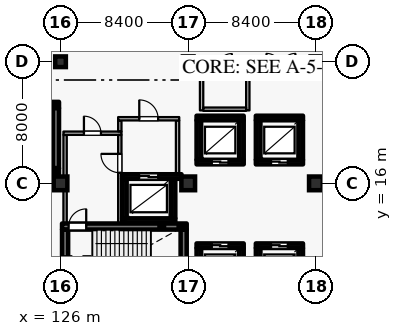
"""IFC4 building model, lengths in metres.
Left out: names, types, materials, properties, quantities, classifications, styles, units other than length and angle.
Written with IfcOpenShell. Run it as: python <this file> out.ifc"""

import sys

from ifc_helpers import new_model, si_unit, direction, frame, frame_2d, origin, origin_2d, place, context, subcontext, project, spatial, rectangle, hollow_rectangle, extrude, element, fill, save


model = new_model("IFC4")
c1 = context("Model", 3, precision=1e-05, world=origin(), true_north=direction((0.0, 1.0)))
c2 = subcontext(c1, "Body", "Model", "MODEL_VIEW")
j1 = project(units=[si_unit("LENGTHUNIT", "METRE"), si_unit("PLANEANGLEUNIT", "RADIAN")], contexts=[c1])
p1 = place(None, origin())
s1 = spatial("IfcSite", under=j1, at=p1, CompositionType="ELEMENT")
p2 = place(p1, origin())
s2 = spatial("IfcBuilding", under=s1, at=p2, CompositionType="ELEMENT")
p3 = place(p2, frame((0.0, 0.0, 11.4)))
s3 = spatial("IfcBuildingStorey", under=s2, at=p3, CompositionType="ELEMENT", Elevation=11.4)
for number, where, z_axis, x_axis in (
    (1, (126.0, 16.0, 0.0), (0.0, 0.0, 1.0), (1.0, 0.0, 0.0)),
    (2, (134.4, 16.0, 0.0), (0.0, 0.0, 1.0), (1.0, 0.0, 0.0)),
    (3, (142.8, 16.0, 0.0), (0.0, 0.0, 1.0), (1.0, 0.0, 0.0)),
):
    element("IfcColumn", number, at=place(p3, frame(where, z_axis=z_axis, x_axis=x_axis)), inside=s3, PredefinedType="COLUMN", context=c2, shape_type="SweptSolid", body=[
        extrude(rectangle(XDim=0.9, YDim=0.9, at=origin_2d()), origin(), (0.0, 0.0, 1.0), 4.8),
    ])
for number, where, z_axis, x_axis in (
    (4, (126.0, 24.0, 0.0), (0.0, 0.0, 1.0), (1.0, 0.0, 0.0)),
    (5, (134.4, 24.0, 0.0), (0.0, 0.0, 1.0), (1.0, 0.0, 0.0)),
    (6, (142.8, 24.0, 0.0), (0.0, 0.0, 1.0), (1.0, 0.0, 0.0)),
):
    element("IfcColumn", number, at=place(p3, frame(where, z_axis=z_axis, x_axis=x_axis)), inside=s3, PredefinedType="COLUMN", context=c2, shape_type="SweptSolid", body=[
        extrude(rectangle(XDim=0.7, YDim=0.7, at=origin_2d()), origin(), (0.0, 0.0, 1.0), 4.8),
    ])
p4 = place(p3, frame((134.95, 17.4, 0.0), z_axis=(0.0, 0.0, 1.0), x_axis=(1.0, 0.0, 0.0)))
e7 = element("IfcWall", 7, at=p4, inside=s3, PredefinedType="SHEAR", context=c2, shape_type="SweptSolid", body=[
    extrude(rectangle(XDim=3.1, YDim=0.3, at=frame_2d((1.55, 0.0))), origin(), (0.0, 0.0, 1.0), 4.535),
])
p5 = place(p4, frame((1.0, 0.0, 0.0)))
e8 = element("IfcOpeningElement", 8, at=p5, cuts=e7, PredefinedType="OPENING", context=c2, shape_type="SweptSolid", body=[
    extrude(rectangle(XDim=1.1, YDim=2.2, at=frame_2d((0.55, 1.1))), frame((0.0, 0.16, 0.0), z_axis=(0.0, -1.0, 0.0), x_axis=(1.0, 0.0, 0.0)), (0.0, 0.0, 1.0), 0.32),
])
p6 = place(p3, frame((137.9, 17.555, 0.0), z_axis=(0.0, 0.0, 1.0), x_axis=(0.0, 1.0, 0.0)))
e9 = element("IfcWall", 9, at=p6, inside=s3, PredefinedType="SHEAR", context=c2, shape_type="SweptSolid", body=[
    extrude(rectangle(XDim=2.59, YDim=0.3, at=frame_2d((1.295, 0.0))), origin(), (0.0, 0.0, 1.0), 4.535),
])
p7 = place(p3, frame((138.05, 20.3, 0.0), z_axis=(0.0, 0.0, 1.0), x_axis=(-1.0, 0.0, 0.0)))
e10 = element("IfcWall", 10, at=p7, inside=s3, PredefinedType="SHEAR", context=c2, shape_type="SweptSolid", body=[
    extrude(rectangle(XDim=3.1, YDim=0.3, at=frame_2d((1.55, 0.0))), origin(), (0.0, 0.0, 1.0), 4.535),
])
p8 = place(p3, frame((135.1, 20.145, 0.0), z_axis=(0.0, 0.0, 1.0), x_axis=(0.0, -1.0, 0.0)))
e11 = element("IfcWall", 11, at=p8, inside=s3, PredefinedType="SHEAR", context=c2, shape_type="SweptSolid", body=[
    extrude(rectangle(XDim=2.59, YDim=0.3, at=frame_2d((1.295, 0.0))), origin(), (0.0, 0.0, 1.0), 4.535),
])
p9 = place(p3, frame((138.85, 17.4, 0.0), z_axis=(0.0, 0.0, 1.0), x_axis=(1.0, 0.0, 0.0)))
e12 = element("IfcWall", 12, at=p9, inside=s3, PredefinedType="SHEAR", context=c2, shape_type="SweptSolid", body=[
    extrude(rectangle(XDim=3.1, YDim=0.3, at=frame_2d((1.55, 0.0))), origin(), (0.0, 0.0, 1.0), 4.535),
])
p10 = place(p9, frame((1.0, 0.0, 0.0)))
e13 = element("IfcOpeningElement", 13, at=p10, cuts=e12, PredefinedType="OPENING", context=c2, shape_type="SweptSolid", body=[
    extrude(rectangle(XDim=1.1, YDim=2.2, at=frame_2d((0.55, 1.1))), frame((0.0, 0.16, 0.0), z_axis=(0.0, -1.0, 0.0), x_axis=(1.0, 0.0, 0.0)), (0.0, 0.0, 1.0), 0.32),
])
p11 = place(p3, frame((141.8, 17.555, 0.0), z_axis=(0.0, 0.0, 1.0), x_axis=(0.0, 1.0, 0.0)))
e14 = element("IfcWall", 14, at=p11, inside=s3, PredefinedType="SHEAR", context=c2, shape_type="SweptSolid", body=[
    extrude(rectangle(XDim=2.59, YDim=0.3, at=frame_2d((1.295, 0.0))), origin(), (0.0, 0.0, 1.0), 4.535),
])
p12 = place(p3, frame((141.95, 20.3, 0.0), z_axis=(0.0, 0.0, 1.0), x_axis=(-1.0, 0.0, 0.0)))
e15 = element("IfcWall", 15, at=p12, inside=s3, PredefinedType="SHEAR", context=c2, shape_type="SweptSolid", body=[
    extrude(rectangle(XDim=3.1, YDim=0.3, at=frame_2d((1.55, 0.0))), origin(), (0.0, 0.0, 1.0), 4.535),
])
for number, where, z_axis, x_axis in (
    (16, (139.0, 20.145, 0.0), (0.0, 0.0, 1.0), (0.0, -1.0, 0.0)),
    (17, (137.9, 9.155, 0.0), (0.0, 0.0, 1.0), (0.0, 1.0, 0.0)),
):
    element("IfcWall", number, at=place(p3, frame(where, z_axis=z_axis, x_axis=x_axis)), inside=s3, PredefinedType="SHEAR", context=c2, shape_type="SweptSolid", body=[
        extrude(rectangle(XDim=2.59, YDim=0.3, at=frame_2d((1.295, 0.0))), origin(), (0.0, 0.0, 1.0), 4.535),
    ])
p13 = place(p3, frame((138.05, 11.9, 0.0), z_axis=(0.0, 0.0, 1.0), x_axis=(-1.0, 0.0, 0.0)))
e18 = element("IfcWall", 18, at=p13, inside=s3, PredefinedType="SHEAR", context=c2, shape_type="SweptSolid", body=[
    extrude(rectangle(XDim=3.1, YDim=0.3, at=frame_2d((1.55, 0.0))), origin(), (0.0, 0.0, 1.0), 4.535),
])
p14 = place(p13, frame((1.0, 0.0, 0.0)))
e19 = element("IfcOpeningElement", 19, at=p14, cuts=e18, PredefinedType="OPENING", context=c2, shape_type="SweptSolid", body=[
    extrude(rectangle(XDim=1.1, YDim=2.2, at=frame_2d((0.55, 1.1))), frame((0.0, 0.16, 0.0), z_axis=(0.0, -1.0, 0.0), x_axis=(1.0, 0.0, 0.0)), (0.0, 0.0, 1.0), 0.32),
])
for number, where, z_axis, x_axis in (
    (20, (135.1, 11.745, 0.0), (0.0, 0.0, 1.0), (0.0, -1.0, 0.0)),
    (21, (141.8, 9.155, 0.0), (0.0, 0.0, 1.0), (0.0, 1.0, 0.0)),
):
    element("IfcWall", number, at=place(p3, frame(where, z_axis=z_axis, x_axis=x_axis)), inside=s3, PredefinedType="SHEAR", context=c2, shape_type="SweptSolid", body=[
        extrude(rectangle(XDim=2.59, YDim=0.3, at=frame_2d((1.295, 0.0))), origin(), (0.0, 0.0, 1.0), 4.535),
    ])
p15 = place(p3, frame((141.95, 11.9, 0.0), z_axis=(0.0, 0.0, 1.0), x_axis=(-1.0, 0.0, 0.0)))
e22 = element("IfcWall", 22, at=p15, inside=s3, PredefinedType="SHEAR", context=c2, shape_type="SweptSolid", body=[
    extrude(rectangle(XDim=3.1, YDim=0.3, at=frame_2d((1.55, 0.0))), origin(), (0.0, 0.0, 1.0), 4.535),
])
p16 = place(p15, frame((1.0, 0.0, 0.0)))
e23 = element("IfcOpeningElement", 23, at=p16, cuts=e22, PredefinedType="OPENING", context=c2, shape_type="SweptSolid", body=[
    extrude(rectangle(XDim=1.1, YDim=2.2, at=frame_2d((0.55, 1.1))), frame((0.0, 0.16, 0.0), z_axis=(0.0, -1.0, 0.0), x_axis=(1.0, 0.0, 0.0)), (0.0, 0.0, 1.0), 0.32),
])
p17 = place(p3, frame((139.0, 11.745, 0.0), z_axis=(0.0, 0.0, 1.0), x_axis=(0.0, -1.0, 0.0)))
e24 = element("IfcWall", 24, at=p17, inside=s3, PredefinedType="SHEAR", context=c2, shape_type="SweptSolid", body=[
    extrude(rectangle(XDim=2.59, YDim=0.3, at=frame_2d((1.295, 0.0))), origin(), (0.0, 0.0, 1.0), 4.535),
])
p18 = place(p3, frame((130.05, 13.55, 0.0), z_axis=(0.0, 0.0, 1.0), x_axis=(1.0, 0.0, 0.0)))
e25 = element("IfcWall", 25, at=p18, inside=s3, PredefinedType="SHEAR", context=c2, shape_type="SweptSolid", body=[
    extrude(rectangle(XDim=3.5, YDim=0.3, at=frame_2d((1.75, 0.0))), origin(), (0.0, 0.0, 1.0), 4.535),
])
p19 = place(p3, frame((133.4, 13.705, 0.0), z_axis=(0.0, 0.0, 1.0), x_axis=(0.0, 1.0, 0.0)))
e26 = element("IfcWall", 26, at=p19, inside=s3, PredefinedType="SHEAR", context=c2, shape_type="SweptSolid", body=[
    extrude(rectangle(XDim=2.59, YDim=0.3, at=frame_2d((1.295, 0.0))), origin(), (0.0, 0.0, 1.0), 4.535),
])
p20 = place(p3, frame((133.96, 16.45, 0.0), z_axis=(0.0, 0.0, 1.0), x_axis=(-1.0, 0.0, 0.0)))
e27 = element("IfcWall", 27, at=p20, inside=s3, PredefinedType="SHEAR", context=c2, shape_type="SweptSolid", body=[
    extrude(rectangle(XDim=3.91, YDim=0.3, at=frame_2d((1.955, 0.0))), origin(), (0.0, 0.0, 1.0), 4.535),
])
p21 = place(p20, frame((1.535, 0.0, 0.0)))
e28 = element("IfcOpeningElement", 28, at=p21, cuts=e27, PredefinedType="OPENING", context=c2, shape_type="SweptSolid", body=[
    extrude(rectangle(XDim=1.25, YDim=2.25, at=frame_2d((0.625, 1.125))), frame((0.0, 0.16, 0.0), z_axis=(0.0, -1.0, 0.0), x_axis=(1.0, 0.0, 0.0)), (0.0, 0.0, 1.0), 0.32),
])
p22 = place(p3, frame((130.2, 16.295, 0.0), z_axis=(0.0, 0.0, 1.0), x_axis=(0.0, -1.0, 0.0)))
e29 = element("IfcWall", 29, at=p22, inside=s3, PredefinedType="SHEAR", context=c2, shape_type="SweptSolid", body=[
    extrude(rectangle(XDim=2.59, YDim=0.3, at=frame_2d((1.295, 0.0))), origin(), (0.0, 0.0, 1.0), 4.535),
])
p23 = place(p3, frame((134.1, 9.005, 0.0), z_axis=(0.0, 0.0, 1.0), x_axis=(0.0, 1.0, 0.0)))
e30 = element("IfcWall", 30, at=p23, inside=s3, PredefinedType="SHEAR", context=c2, shape_type="SweptSolid", body=[
    extrude(rectangle(XDim=3.95, YDim=0.4, at=frame_2d((1.975, 0.0))), origin(), (0.0, 0.0, 1.0), 4.535),
])
p24 = place(p3, frame((126.1, 13.16, 0.0), z_axis=(0.0, 0.0, 1.0), x_axis=(1.0, 0.0, 0.0)))
e31 = element("IfcWall", 31, at=p24, inside=s3, PredefinedType="SHEAR", context=c2, shape_type="SweptSolid", body=[
    extrude(rectangle(XDim=8.2, YDim=0.4, at=frame_2d((4.1, 0.0))), origin(), (0.0, 0.0, 1.0), 4.535),
])
p25 = place(p24, frame((0.43, 0.0, 0.0)))
e32 = element("IfcOpeningElement", 32, at=p25, cuts=e31, PredefinedType="OPENING", context=c2, shape_type="SweptSolid", body=[
    extrude(rectangle(XDim=1.16, YDim=2.2, at=frame_2d((0.58, 1.1))), frame((0.0, 0.21, 0.0), z_axis=(0.0, -1.0, 0.0), x_axis=(1.0, 0.0, 0.0)), (0.0, 0.0, 1.0), 0.42),
])
p26 = place(p3, frame((126.3, 9.005, 0.0), z_axis=(0.0, 0.0, 1.0), x_axis=(0.0, 1.0, 0.0)))
e33 = element("IfcWall", 33, at=p26, inside=s3, PredefinedType="SHEAR", context=c2, shape_type="SweptSolid", body=[
    extrude(rectangle(XDim=3.95, YDim=0.4, at=frame_2d((1.975, 0.0))), origin(), (0.0, 0.0, 1.0), 4.535),
])
p27 = place(p3, frame((126.3, 13.365, 0.0), z_axis=(0.0, 0.0, 1.0), x_axis=(0.0, 1.0, 0.0)))
e34 = element("IfcWall", 34, at=p27, inside=s3, PredefinedType="PARTITIONING", context=c2, shape_type="SweptSolid", body=[
    extrude(rectangle(XDim=5.82, YDim=0.22, at=frame_2d((2.91, 0.0))), origin(), (0.0, 0.0, 1.0), 4.535),
])
p28 = place(p3, frame((126.19, 19.3, 0.0), z_axis=(0.0, 0.0, 1.0), x_axis=(1.0, 0.0, 0.0)))
e35 = element("IfcWall", 35, at=p28, inside=s3, PredefinedType="PARTITIONING", context=c2, shape_type="SweptSolid", body=[
    extrude(rectangle(XDim=3.82, YDim=0.22, at=frame_2d((1.91, 0.0))), origin(), (0.0, 0.0, 1.0), 4.535),
])
p29 = place(p28, frame((1.35, 0.0, 0.0)))
e36 = element("IfcOpeningElement", 36, at=p29, cuts=e35, PredefinedType="OPENING", context=c2, shape_type="SweptSolid", body=[
    extrude(rectangle(XDim=1.12, YDim=2.2, at=frame_2d((0.56, 1.1))), frame((0.0, 0.12, 0.0), z_axis=(0.0, -1.0, 0.0), x_axis=(1.0, 0.0, 0.0)), (0.0, 0.0, 1.0), 0.24),
])
p30 = place(p3, frame((129.9, 13.365, 0.0), z_axis=(0.0, 0.0, 1.0), x_axis=(0.0, 1.0, 0.0)))
e37 = element("IfcWall", 37, at=p30, inside=s3, PredefinedType="PARTITIONING", context=c2, shape_type="SweptSolid", body=[
    extrude(rectangle(XDim=5.82, YDim=0.22, at=frame_2d((2.91, 0.0))), origin(), (0.0, 0.0, 1.0), 4.535),
])
p31 = place(p30, frame((3.335, 0.0, 0.0)))
e38 = element("IfcOpeningElement", 38, at=p31, cuts=e37, PredefinedType="OPENING", context=c2, shape_type="SweptSolid", body=[
    extrude(rectangle(XDim=1.24, YDim=2.2, at=frame_2d((0.62, 1.1))), frame((0.0, 0.12, 0.0), z_axis=(0.0, -1.0, 0.0), x_axis=(1.0, 0.0, 0.0)), (0.0, 0.0, 1.0), 0.24),
])
p32 = place(p3, frame((129.9, 19.415, 0.0), z_axis=(0.0, 0.0, 1.0), x_axis=(0.0, 1.0, 0.0)))
e39 = element("IfcWall", 39, at=p32, inside=s3, PredefinedType="PARTITIONING", context=c2, shape_type="SweptSolid", body=[
    extrude(rectangle(XDim=0.72, YDim=0.22, at=frame_2d((0.36, 0.0))), origin(), (0.0, 0.0, 1.0), 4.535),
])
p33 = place(p3, frame((133.7, 16.605, 0.0), z_axis=(0.0, 0.0, 1.0), x_axis=(0.0, 1.0, 0.0)))
e40 = element("IfcWall", 40, at=p33, inside=s3, PredefinedType="PARTITIONING", context=c2, shape_type="SweptSolid", body=[
    extrude(rectangle(XDim=3.53, YDim=0.22, at=frame_2d((1.765, 0.0))), origin(), (0.0, 0.0, 1.0), 4.535),
])
p34 = place(p3, frame((129.79, 20.25, 0.0), z_axis=(0.0, 0.0, 1.0), x_axis=(1.0, 0.0, 0.0)))
e41 = element("IfcWall", 41, at=p34, inside=s3, PredefinedType="PARTITIONING", context=c2, shape_type="SweptSolid", body=[
    extrude(rectangle(XDim=4.02, YDim=0.22, at=frame_2d((2.01, 0.0))), origin(), (0.0, 0.0, 1.0), 4.535),
])
p35 = place(p34, frame((1.39, 0.0, 0.0)))
e42 = element("IfcOpeningElement", 42, at=p35, cuts=e41, PredefinedType="OPENING", context=c2, shape_type="SweptSolid", body=[
    extrude(rectangle(XDim=1.24, YDim=2.2, at=frame_2d((0.62, 1.1))), frame((0.0, 0.12, 0.0), z_axis=(0.0, -1.0, 0.0), x_axis=(1.0, 0.0, 0.0)), (0.0, 0.0, 1.0), 0.24),
])
for number, where, z_axis, x_axis in (
    (43, (132.66, 13.16, -2.7), (0.0, 0.0, 1.0), (1.0, 0.0, 0.0)),
    (44, (133.92, 13.16, -2.7), (0.0, 0.0, 1.0), (1.0, 0.0, 0.0)),
):
    element("IfcColumn", number, at=place(p3, frame(where, z_axis=z_axis, x_axis=x_axis)), inside=s3, PredefinedType="COLUMN", context=c2, shape_type="SweptSolid", body=[
        extrude(hollow_rectangle(XDim=0.3, YDim=0.3, WallThickness=0.012, at=origin_2d()), origin(), (0.0, 0.0, 1.0), 4.92),
    ])
p36 = place(p3, frame((117.7, 16.8, 0.0), z_axis=(0.0, 0.0, 1.0), x_axis=(1.0, 0.0, 0.0)))
e45 = element("IfcWall", 45, at=p36, inside=s3, PredefinedType="SHEAR", context=c2, shape_type="SweptSolid", body=[
    extrude(rectangle(XDim=8.2, YDim=0.4, at=frame_2d((4.1, 0.0))), origin(), (0.0, 0.0, 1.0), 4.535),
])
p37 = place(p3, frame((125.7, 17.005, 0.0), z_axis=(0.0, 0.0, 1.0), x_axis=(0.0, 1.0, 0.0)))
e46 = element("IfcWall", 46, at=p37, inside=s3, PredefinedType="SHEAR", context=c2, shape_type="SweptSolid", body=[
    extrude(rectangle(XDim=3.95, YDim=0.4, at=frame_2d((1.975, 0.0))), origin(), (0.0, 0.0, 1.0), 4.535),
])
p38 = place(p3, frame((117.7, 21.16, 0.0), z_axis=(0.0, 0.0, 1.0), x_axis=(1.0, 0.0, 0.0)))
e47 = element("IfcWall", 47, at=p38, inside=s3, PredefinedType="SHEAR", context=c2, shape_type="SweptSolid", body=[
    extrude(rectangle(XDim=8.2, YDim=0.4, at=frame_2d((4.1, 0.0))), origin(), (0.0, 0.0, 1.0), 4.535),
])
p39 = place(p38, frame((0.43, 0.0, 0.0)))
e48 = element("IfcOpeningElement", 48, at=p39, cuts=e47, PredefinedType="OPENING", context=c2, shape_type="SweptSolid", body=[
    extrude(rectangle(XDim=1.16, YDim=2.2, at=frame_2d((0.58, 1.1))), frame((0.0, 0.21, 0.0), z_axis=(0.0, -1.0, 0.0), x_axis=(1.0, 0.0, 0.0)), (0.0, 0.0, 1.0), 0.42),
])
for number, where, z_axis, x_axis in (
    (49, (125.52, 16.8, -2.7), (0.0, 0.0, 1.0), (1.0, 0.0, 0.0)),
    (50, (125.52, 21.16, -2.7), (0.0, 0.0, 1.0), (1.0, 0.0, 0.0)),
):
    element("IfcColumn", number, at=place(p3, frame(where, z_axis=z_axis, x_axis=x_axis)), inside=s3, PredefinedType="COLUMN", context=c2, shape_type="SweptSolid", body=[
        extrude(hollow_rectangle(XDim=0.3, YDim=0.3, WallThickness=0.012, at=origin_2d()), origin(), (0.0, 0.0, 1.0), 4.92),
    ])
p40 = place(p3, frame((138.96, 23.6, 0.0), z_axis=(0.0, 0.0, 1.0), x_axis=(1.0, 0.0, 0.0)))
e51 = element("IfcWall", 51, at=p40, inside=s3, PredefinedType="PARTITIONING", context=c2, shape_type="SweptSolid", body=[
    extrude(rectangle(XDim=3.08, YDim=0.14, at=frame_2d((1.54, 0.0))), origin(), (0.0, 0.0, 1.0), 4.535),
])
p41 = place(p40, frame((0.59, 0.0, 0.0)))
e52 = element("IfcOpeningElement", 52, at=p41, cuts=e51, PredefinedType="OPENING", context=c2, shape_type="SweptSolid", body=[
    extrude(rectangle(XDim=1.9, YDim=2.4, at=frame_2d((0.95, 1.2))), frame((0.0, 0.08, 0.0), z_axis=(0.0, -1.0, 0.0), x_axis=(1.0, 0.0, 0.0)), (0.0, 0.0, 1.0), 0.16),
])
p42 = place(p3, frame((135.36, 23.6, 0.0), z_axis=(0.0, 0.0, 1.0), x_axis=(1.0, 0.0, 0.0)))
e53 = element("IfcWall", 53, at=p42, inside=s3, PredefinedType="PARTITIONING", context=c2, shape_type="SweptSolid", body=[
    extrude(rectangle(XDim=2.88, YDim=0.22, at=frame_2d((1.44, 0.0))), origin(), (0.0, 0.0, 1.0), 4.535),
])
p43 = place(p42, frame((0.97, 0.0, 0.0)))
e54 = element("IfcOpeningElement", 54, at=p43, cuts=e53, PredefinedType="OPENING", context=c2, shape_type="SweptSolid", body=[
    extrude(rectangle(XDim=0.94, YDim=2.15, at=frame_2d((0.47, 1.075))), frame((0.0, 0.12, 0.0), z_axis=(0.0, -1.0, 0.0), x_axis=(1.0, 0.0, 0.0)), (0.0, 0.0, 1.0), 0.24),
])
for number, where, z_axis, x_axis in (
    (55, (135.28, 20.8, 0.0), (0.0, 0.0, 1.0), (0.0, 1.0, 0.0)),
    (56, (138.32, 20.8, 0.0), (0.0, 0.0, 1.0), (0.0, 1.0, 0.0)),
):
    element("IfcWall", number, at=place(p3, frame(where, z_axis=z_axis, x_axis=x_axis)), inside=s3, PredefinedType="PARTITIONING", context=c2, shape_type="SweptSolid", body=[
        extrude(rectangle(XDim=2.748, YDim=0.22, at=frame_2d((1.374, 0.0))), origin(), (0.0, 0.0, 1.0), 4.535),
    ])
p44 = place(p3, frame((135.39, 20.88, 0.0), z_axis=(0.0, 0.0, 1.0), x_axis=(1.0, 0.0, 0.0)))
e57 = element("IfcWall", 57, at=p44, inside=s3, PredefinedType="PARTITIONING", context=c2, shape_type="SweptSolid", body=[
    extrude(rectangle(XDim=2.82, YDim=0.22, at=frame_2d((1.41, 0.0))), origin(), (0.0, 0.0, 1.0), 4.535),
])
p45 = place(p5, origin())
e58 = element("IfcDoor", 58, at=p45, inside=s3, OperationType="DOUBLE_DOOR_SLIDING", PredefinedType="DOOR", context=c2, shape_type="SweptSolid", body=[
    extrude(rectangle(XDim=1.1, YDim=2.2, at=frame_2d((0.55, 1.1))), frame((0.0, 0.025, 0.0), z_axis=(0.0, -1.0, 0.0), x_axis=(1.0, 0.0, 0.0)), (0.0, 0.0, 1.0), 0.05),
])
fill(e8, e58)
p46 = place(p10, origin())
e59 = element("IfcDoor", 59, at=p46, inside=s3, OperationType="DOUBLE_DOOR_SLIDING", PredefinedType="DOOR", context=c2, shape_type="SweptSolid", body=[
    extrude(rectangle(XDim=1.1, YDim=2.2, at=frame_2d((0.55, 1.1))), frame((0.0, 0.025, 0.0), z_axis=(0.0, -1.0, 0.0), x_axis=(1.0, 0.0, 0.0)), (0.0, 0.0, 1.0), 0.05),
])
fill(e13, e59)
p47 = place(p14, origin())
e60 = element("IfcDoor", 60, at=p47, inside=s3, OperationType="DOUBLE_DOOR_SLIDING", PredefinedType="DOOR", context=c2, shape_type="SweptSolid", body=[
    extrude(rectangle(XDim=1.1, YDim=2.2, at=frame_2d((0.55, 1.1))), frame((0.0, 0.025, 0.0), z_axis=(0.0, -1.0, 0.0), x_axis=(1.0, 0.0, 0.0)), (0.0, 0.0, 1.0), 0.05),
])
fill(e19, e60)
p48 = place(p16, origin())
e61 = element("IfcDoor", 61, at=p48, inside=s3, OperationType="DOUBLE_DOOR_SLIDING", PredefinedType="DOOR", context=c2, shape_type="SweptSolid", body=[
    extrude(rectangle(XDim=1.1, YDim=2.2, at=frame_2d((0.55, 1.1))), frame((0.0, 0.025, 0.0), z_axis=(0.0, -1.0, 0.0), x_axis=(1.0, 0.0, 0.0)), (0.0, 0.0, 1.0), 0.05),
])
fill(e23, e61)
p49 = place(p21, origin())
e62 = element("IfcDoor", 62, at=p49, inside=s3, OperationType="DOUBLE_DOOR_SLIDING", PredefinedType="DOOR", context=c2, shape_type="SweptSolid", body=[
    extrude(rectangle(XDim=1.25, YDim=2.25, at=frame_2d((0.625, 1.125))), frame((0.0, 0.025, 0.0), z_axis=(0.0, -1.0, 0.0), x_axis=(1.0, 0.0, 0.0)), (0.0, 0.0, 1.0), 0.05),
])
fill(e28, e62)
p50 = place(p25, origin())
e63 = element("IfcDoor", 63, at=p50, inside=s3, OperationType="SINGLE_SWING_RIGHT", PredefinedType="DOOR", context=c2, shape_type="SweptSolid", body=[
    extrude(rectangle(XDim=1.16, YDim=2.2, at=frame_2d((0.58, 1.1))), frame((0.0, 0.025, 0.0), z_axis=(0.0, -1.0, 0.0), x_axis=(1.0, 0.0, 0.0)), (0.0, 0.0, 1.0), 0.05),
])
fill(e32, e63)
p51 = place(p29, origin())
e64 = element("IfcDoor", 64, at=p51, inside=s3, OperationType="SINGLE_SWING_LEFT", PredefinedType="DOOR", context=c2, shape_type="SweptSolid", body=[
    extrude(rectangle(XDim=1.12, YDim=2.2, at=frame_2d((0.56, 1.1))), frame((0.0, 0.025, 0.0), z_axis=(0.0, -1.0, 0.0), x_axis=(1.0, 0.0, 0.0)), (0.0, 0.0, 1.0), 0.05),
])
fill(e36, e64)
p52 = place(p31, origin())
e65 = element("IfcDoor", 65, at=p52, inside=s3, OperationType="SINGLE_SWING_RIGHT", PredefinedType="DOOR", context=c2, shape_type="SweptSolid", body=[
    extrude(rectangle(XDim=1.24, YDim=2.2, at=frame_2d((0.62, 1.1))), frame((0.0, 0.025, 0.0), z_axis=(0.0, -1.0, 0.0), x_axis=(1.0, 0.0, 0.0)), (0.0, 0.0, 1.0), 0.05),
])
fill(e38, e65)
p53 = place(p35, origin())
e66 = element("IfcDoor", 66, at=p53, inside=s3, OperationType="SINGLE_SWING_LEFT", PredefinedType="DOOR", context=c2, shape_type="SweptSolid", body=[
    extrude(rectangle(XDim=1.24, YDim=2.2, at=frame_2d((0.62, 1.1))), frame((0.0, 0.025, 0.0), z_axis=(0.0, -1.0, 0.0), x_axis=(1.0, 0.0, 0.0)), (0.0, 0.0, 1.0), 0.05),
])
fill(e42, e66)
p54 = place(p41, origin())
e67 = element("IfcDoor", 67, at=p54, inside=s3, OperationType="DOUBLE_DOOR_SINGLE_SWING", PredefinedType="DOOR", context=c2, shape_type="SweptSolid", body=[
    extrude(rectangle(XDim=1.9, YDim=2.4, at=frame_2d((0.95, 1.2))), frame((0.0, 0.025, 0.0), z_axis=(0.0, -1.0, 0.0), x_axis=(1.0, 0.0, 0.0)), (0.0, 0.0, 1.0), 0.05),
])
fill(e52, e67)
p55 = place(p43, origin())
e68 = element("IfcDoor", 68, at=p55, inside=s3, OperationType="SINGLE_SWING_RIGHT", PredefinedType="DOOR", context=c2, shape_type="SweptSolid", body=[
    extrude(rectangle(XDim=0.94, YDim=2.15, at=frame_2d((0.47, 1.075))), frame((0.0, 0.025, 0.0), z_axis=(0.0, -1.0, 0.0), x_axis=(1.0, 0.0, 0.0)), (0.0, 0.0, 1.0), 0.05),
])
fill(e54, e68)
save(model, sys.argv[1])
